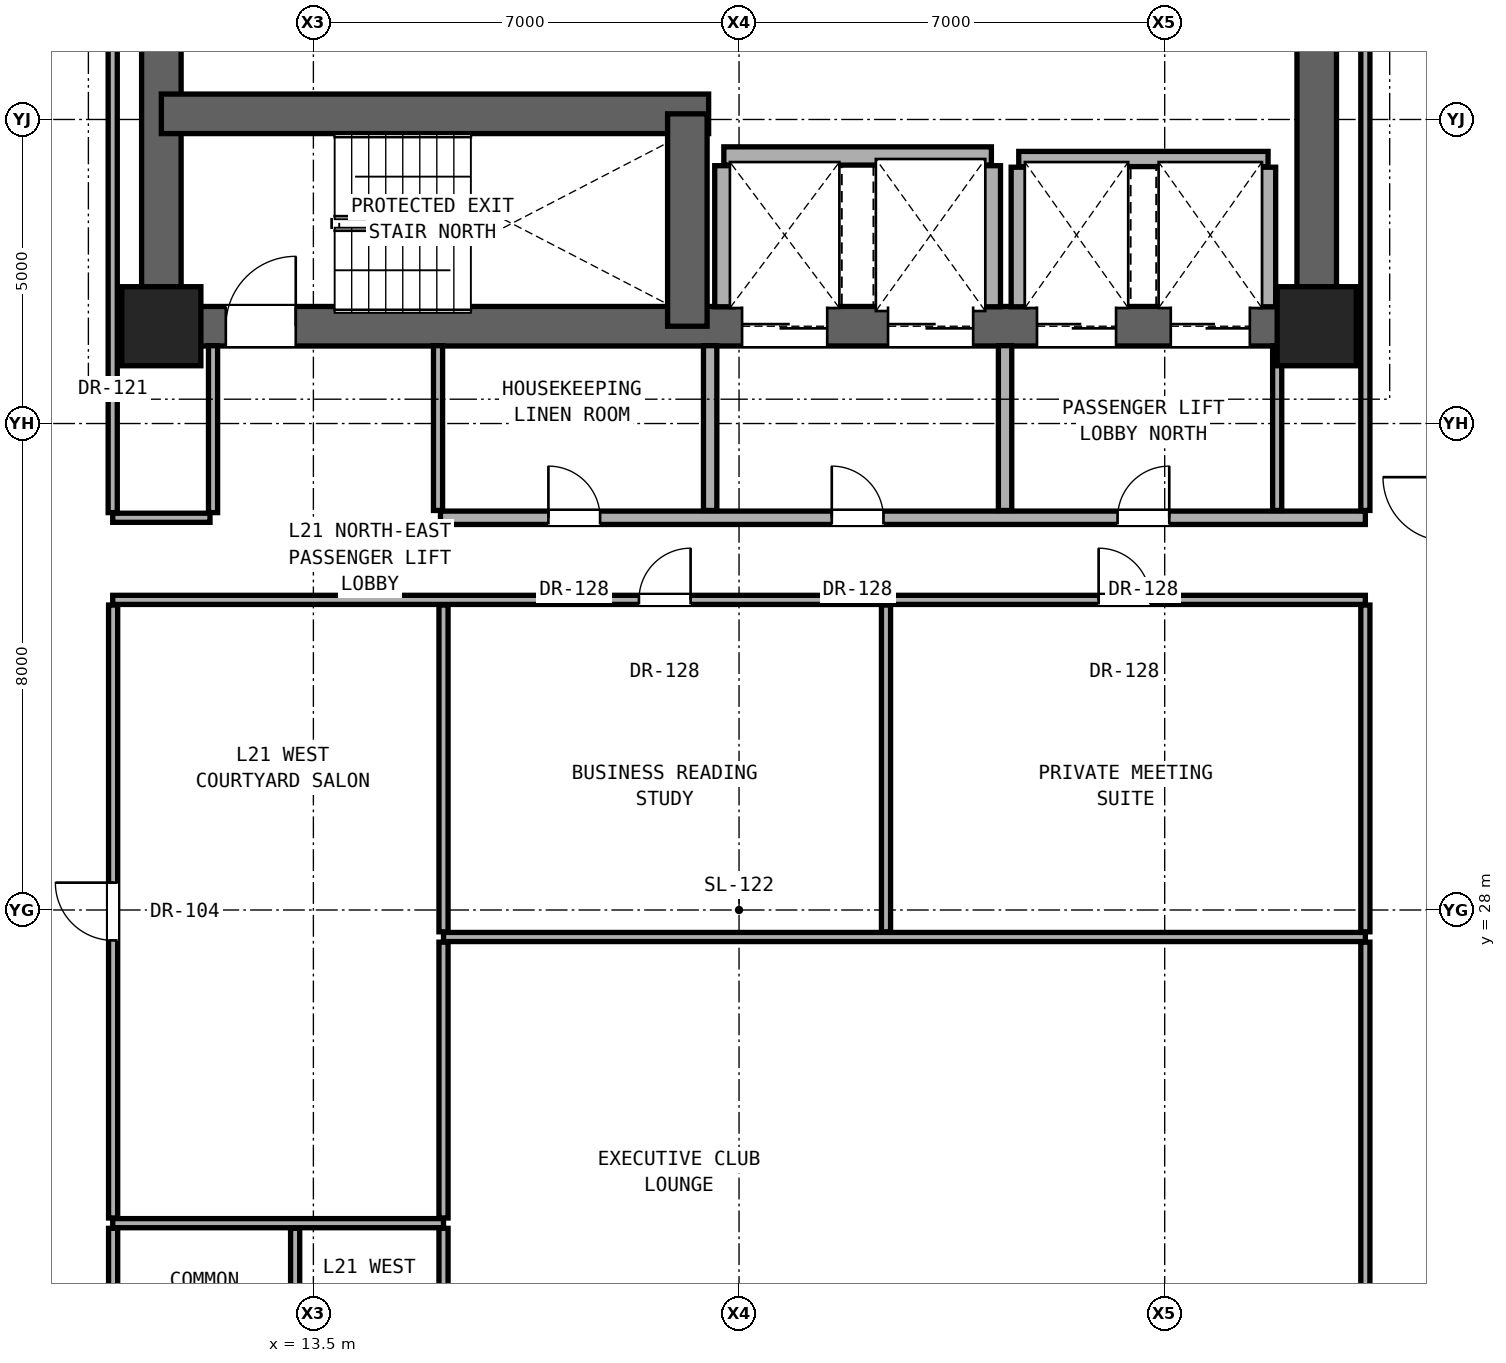
"""IFC4 building model, lengths in metres.
Left out: names, types, materials, properties, quantities, classifications, styles, units other than length and angle.
Written with IfcOpenShell. Run it as: python <this file> out.ifc"""

import sys

from ifc_helpers import new_model, si_unit, direction, frame, frame_2d, origin, origin_2d, place, context, subcontext, project, spatial, rectangle, extrude, element, fill, save


model = new_model("IFC4")
c1 = context("Model", 3, precision=1e-05, world=origin(), true_north=direction((0.0, 1.0)))
c2 = subcontext(c1, "Body", "Model", "MODEL_VIEW")
j1 = project(units=[si_unit("LENGTHUNIT", "METRE"), si_unit("PLANEANGLEUNIT", "RADIAN")], contexts=[c1])
p1 = place(None, origin())
s1 = spatial("IfcSite", under=j1, at=p1, CompositionType="ELEMENT")
p2 = place(p1, origin())
s2 = spatial("IfcBuilding", under=s1, at=p2, CompositionType="ELEMENT")
p3 = place(p2, frame((0.0, 0.0, 75.2)))
s3 = spatial("IfcBuildingStorey", under=s2, at=p3, CompositionType="ELEMENT", Elevation=75.2)
for number, where, z_axis, x_axis in (
    (1, (11.0, 37.6, 0.0), (0.0, 0.0, 1.0), (1.0, 0.0, 0.0)),
    (2, (30.0, 37.6, 0.0), (0.0, 0.0, 1.0), (1.0, 0.0, 0.0)),
):
    element("IfcColumn", number, at=place(p3, frame(where, z_axis=z_axis, x_axis=x_axis)), inside=s3, PredefinedType="COLUMN", context=c2, shape_type="SweptSolid", body=[
        extrude(rectangle(XDim=1.3, YDim=1.3, at=origin_2d()), origin(), (0.0, 0.0, 1.0), 3.3),
    ])
for number, where, z_axis, x_axis in (
    (3, (11.0, 37.6, 0.0), (0.0, 0.0, 1.0), (0.0, 1.0, 0.0)),
    (4, (30.0, 37.6, 0.0), (0.0, 0.0, 1.0), (0.0, 1.0, 0.0)),
):
    element("IfcWall", number, at=place(p3, frame(where, z_axis=z_axis, x_axis=x_axis)), inside=s3, PredefinedType="SHEAR", context=c2, shape_type="SweptSolid", body=[
        extrude(rectangle(XDim=6.0, YDim=0.65, at=frame_2d((3.0, 0.0))), origin(), (0.0, 0.0, 1.0), 3.06),
    ])
p4 = place(p3, frame((11.0, 37.6, 0.0), z_axis=(0.0, 0.0, 1.0), x_axis=(1.0, 0.0, 0.0)))
e5 = element("IfcWall", 5, at=p4, inside=s3, PredefinedType="SHEAR", context=c2, shape_type="SweptSolid", body=[
    extrude(rectangle(XDim=19.0, YDim=0.65, at=frame_2d((9.5, 0.0))), origin(), (0.0, 0.0, 1.0), 3.06),
])
p5 = place(p4, frame((1.06, 0.0, 0.0)))
e6 = element("IfcOpeningElement", 6, at=p5, cuts=e5, PredefinedType="OPENING", context=c2, shape_type="SweptSolid", body=[
    extrude(rectangle(XDim=1.15, YDim=2.2, at=frame_2d((0.575, 1.1))), frame((0.0, 0.335, 0.0), z_axis=(0.0, -1.0, 0.0), x_axis=(1.0, 0.0, 0.0)), (0.0, 0.0, 1.0), 0.67),
])
p6 = place(p4, frame((9.55, 0.0, 0.0)))
e7 = element("IfcOpeningElement", 7, at=p6, cuts=e5, PredefinedType="OPENING", context=c2, shape_type="SweptSolid", body=[
    extrude(rectangle(XDim=1.4, YDim=2.35, at=frame_2d((0.7, 1.175))), frame((0.0, 0.335, 0.0), z_axis=(0.0, -1.0, 0.0), x_axis=(1.0, 0.0, 0.0)), (0.0, 0.0, 1.0), 0.67),
])
p7 = place(p4, frame((11.95, 0.0, 0.0)))
e8 = element("IfcOpeningElement", 8, at=p7, cuts=e5, PredefinedType="OPENING", context=c2, shape_type="SweptSolid", body=[
    extrude(rectangle(XDim=1.4, YDim=2.35, at=frame_2d((0.7, 1.175))), frame((0.0, 0.335, 0.0), z_axis=(0.0, -1.0, 0.0), x_axis=(1.0, 0.0, 0.0)), (0.0, 0.0, 1.0), 0.67),
])
p8 = place(p4, frame((14.4, 0.0, 0.0)))
e9 = element("IfcOpeningElement", 9, at=p8, cuts=e5, PredefinedType="OPENING", context=c2, shape_type="SweptSolid", body=[
    extrude(rectangle(XDim=1.3, YDim=2.3, at=frame_2d((0.65, 1.15))), frame((0.0, 0.335, 0.0), z_axis=(0.0, -1.0, 0.0), x_axis=(1.0, 0.0, 0.0)), (0.0, 0.0, 1.0), 0.67),
])
p9 = place(p4, frame((16.6, 0.0, 0.0)))
e10 = element("IfcOpeningElement", 10, at=p9, cuts=e5, PredefinedType="OPENING", context=c2, shape_type="SweptSolid", body=[
    extrude(rectangle(XDim=1.3, YDim=2.3, at=frame_2d((0.65, 1.15))), frame((0.0, 0.335, 0.0), z_axis=(0.0, -1.0, 0.0), x_axis=(1.0, 0.0, 0.0)), (0.0, 0.0, 1.0), 0.67),
])
p10 = place(p3, frame((11.0, 41.093, 0.0), z_axis=(0.0, 0.0, 1.0), x_axis=(1.0, 0.0, 0.0)))
e11 = element("IfcWall", 11, at=p10, inside=s3, PredefinedType="SHEAR", context=c2, shape_type="SweptSolid", body=[
    extrude(rectangle(XDim=9.0, YDim=0.65, at=frame_2d((4.5, 0.0))), origin(), (0.0, 0.0, 1.0), 3.06),
])
p11 = place(p3, frame((19.65, 37.6, 0.0), z_axis=(0.0, 0.0, 1.0), x_axis=(0.0, 1.0, 0.0)))
e12 = element("IfcWall", 12, at=p11, inside=s3, PredefinedType="SHEAR", context=c2, shape_type="SweptSolid", body=[
    extrude(rectangle(XDim=3.493, YDim=0.65, at=frame_2d((1.747, 0.0))), origin(), (0.0, 0.0, 1.0), 3.06),
])
p12 = place(p3, frame((10.2, 22.85, 0.0), z_axis=(0.0, 0.0, 1.0), x_axis=(1.0, 0.0, 0.0)))
e13 = element("IfcWall", 13, at=p12, inside=s3, PredefinedType="PARTITIONING", context=c2, shape_type="SweptSolid", body=[
    extrude(rectangle(XDim=5.44, YDim=0.15, at=frame_2d((2.72, 0.0))), origin(), (0.0, 0.0, 1.0), 2.104),
])
p13 = place(p3, frame((15.64, 27.556, 0.0), z_axis=(0.0, 0.0, 1.0), x_axis=(1.0, 0.0, 0.0)))
e14 = element("IfcWall", 14, at=p13, inside=s3, PredefinedType="PARTITIONING", context=c2, shape_type="SweptSolid", body=[
    extrude(rectangle(XDim=15.16, YDim=0.15, at=frame_2d((7.58, 0.0))), origin(), (0.0, 0.0, 1.0), 2.104),
])
p14 = place(p3, frame((10.2, 33.1, 0.0), z_axis=(0.0, 0.0, 1.0), x_axis=(1.0, 0.0, 0.0)))
e15 = element("IfcWall", 15, at=p14, inside=s3, PredefinedType="PARTITIONING", context=c2, shape_type="SweptSolid", body=[
    extrude(rectangle(XDim=20.6, YDim=0.15, at=frame_2d((10.3, 0.0))), origin(), (0.0, 0.0, 1.0), 2.104),
])
p15 = place(p14, frame((8.654, 0.0, 0.0)))
e16 = element("IfcOpeningElement", 16, at=p15, cuts=e15, PredefinedType="OPENING", context=c2, shape_type="SweptSolid", body=[
    extrude(rectangle(XDim=0.85, YDim=2.01, at=frame_2d((0.425, 1.005))), frame((0.0, 0.085, 0.0), z_axis=(0.0, -1.0, 0.0), x_axis=(1.0, 0.0, 0.0)), (0.0, 0.0, 1.0), 0.17),
])
p16 = place(p14, frame((16.213, 0.0, 0.0)))
e17 = element("IfcOpeningElement", 17, at=p16, cuts=e15, PredefinedType="OPENING", context=c2, shape_type="SweptSolid", body=[
    extrude(rectangle(XDim=0.85, YDim=2.01, at=frame_2d((0.425, 1.005))), frame((0.0, 0.085, 0.0), z_axis=(0.0, -1.0, 0.0), x_axis=(1.0, 0.0, 0.0)), (0.0, 0.0, 1.0), 0.17),
])
p17 = place(p3, frame((10.2, 34.45, 0.0), z_axis=(0.0, 0.0, 1.0), x_axis=(1.0, 0.0, 0.0)))
e18 = element("IfcWall", 18, at=p17, inside=s3, PredefinedType="PARTITIONING", context=c2, shape_type="SweptSolid", body=[
    extrude(rectangle(XDim=1.6, YDim=0.15, at=frame_2d((0.8, 0.0))), origin(), (0.0, 0.0, 1.0), 2.104),
])
p18 = place(p3, frame((15.59, 34.45, 0.0), z_axis=(0.0, 0.0, 1.0), x_axis=(1.0, 0.0, 0.0)))
e19 = element("IfcWall", 19, at=p18, inside=s3, PredefinedType="SOLIDWALL", context=c2, shape_type="SweptSolid", body=[
    extrude(rectangle(XDim=15.21, YDim=0.22, at=frame_2d((7.605, 0.0))), origin(), (0.0, 0.0, 1.0), 2.104),
])
p19 = place(p18, frame((6.435, 0.0, 0.0)))
e20 = element("IfcOpeningElement", 20, at=p19, cuts=e19, PredefinedType="OPENING", context=c2, shape_type="SweptSolid", body=[
    extrude(rectangle(XDim=0.85, YDim=2.01, at=frame_2d((0.425, 1.005))), frame((0.0, 0.12, 0.0), z_axis=(0.0, -1.0, 0.0), x_axis=(1.0, 0.0, 0.0)), (0.0, 0.0, 1.0), 0.24),
])
p20 = place(p18, frame((11.135, 0.0, 0.0)))
e21 = element("IfcOpeningElement", 21, at=p20, cuts=e19, PredefinedType="OPENING", context=c2, shape_type="SweptSolid", body=[
    extrude(rectangle(XDim=0.85, YDim=2.01, at=frame_2d((0.425, 1.005))), frame((0.0, 0.12, 0.0), z_axis=(0.0, -1.0, 0.0), x_axis=(1.0, 0.0, 0.0)), (0.0, 0.0, 1.0), 0.24),
])
p21 = place(p18, frame((1.775, 0.0, 0.0)))
e22 = element("IfcOpeningElement", 22, at=p21, cuts=e19, PredefinedType="OPENING", context=c2, shape_type="SweptSolid", body=[
    extrude(rectangle(XDim=0.85, YDim=2.01, at=frame_2d((0.425, 1.005))), frame((0.0, 0.12, 0.0), z_axis=(0.0, -1.0, 0.0), x_axis=(1.0, 0.0, 0.0)), (0.0, 0.0, 1.0), 0.24),
])
p22 = place(p3, frame((25.1, 40.35, 0.0), z_axis=(0.0, 0.0, 1.0), x_axis=(1.0, 0.0, 0.0)))
e23 = element("IfcWall", 23, at=p22, inside=s3, PredefinedType="SOLIDWALL", context=c2, shape_type="SweptSolid", body=[
    extrude(rectangle(XDim=4.1, YDim=0.25, at=frame_2d((2.05, 0.0))), origin(), (0.0, 0.0, 1.0), 3.06),
])
p23 = place(p3, frame((20.25, 40.4, 0.0), z_axis=(0.0, 0.0, 1.0), x_axis=(1.0, 0.0, 0.0)))
e24 = element("IfcWall", 24, at=p23, inside=s3, PredefinedType="SOLIDWALL", context=c2, shape_type="SweptSolid", body=[
    extrude(rectangle(XDim=4.4, YDim=0.3, at=frame_2d((2.2, 0.0))), origin(), (0.0, 0.0, 1.0), 3.06),
])
p24 = place(p3, frame((10.207, 19.985, 0.0), z_axis=(0.0, 0.0, 1.0), x_axis=(0.0, 1.0, 0.0)))
e25 = element("IfcWall", 25, at=p24, inside=s3, PredefinedType="PARTITIONING", context=c2, shape_type="SweptSolid", body=[
    extrude(rectangle(XDim=2.78, YDim=0.15, at=frame_2d((1.39, 0.0))), origin(), (0.0, 0.0, 1.0), 3.06),
])
p25 = place(p3, frame((10.207, 22.935, 0.0), z_axis=(0.0, 0.0, 1.0), x_axis=(0.0, 1.0, 0.0)))
e26 = element("IfcWall", 26, at=p25, inside=s3, PredefinedType="PARTITIONING", context=c2, shape_type="SweptSolid", body=[
    extrude(rectangle(XDim=10.08, YDim=0.15, at=frame_2d((5.04, 0.0))), origin(), (0.0, 0.0, 1.0), 2.279),
])
p26 = place(p25, frame((4.565, 0.0, 0.0)))
e27 = element("IfcOpeningElement", 27, at=p26, cuts=e26, PredefinedType="OPENING", context=c2, shape_type="SweptSolid", body=[
    extrude(rectangle(XDim=0.95, YDim=2.15, at=frame_2d((0.475, 1.075))), frame((0.0, 0.085, 0.0), z_axis=(0.0, -1.0, 0.0), x_axis=(1.0, 0.0, 0.0)), (0.0, 0.0, 1.0), 0.17),
])
p27 = place(p3, frame((10.2, 34.535, 0.0), z_axis=(0.0, 0.0, 1.0), x_axis=(0.0, 1.0, 0.0)))
e28 = element("IfcWall", 28, at=p27, inside=s3, PredefinedType="PARTITIONING", context=c2, shape_type="SweptSolid", body=[
    extrude(rectangle(XDim=9.13, YDim=0.15, at=frame_2d((4.565, 0.0))), origin(), (0.0, 0.0, 1.0), 2.436),
])
p28 = place(p3, frame((11.85, 34.535, 0.0), z_axis=(0.0, 0.0, 1.0), x_axis=(0.0, 1.0, 0.0)))
e29 = element("IfcWall", 29, at=p28, inside=s3, PredefinedType="PARTITIONING", context=c2, shape_type="SweptSolid", body=[
    extrude(rectangle(XDim=2.745, YDim=0.15, at=frame_2d((1.373, 0.0))), origin(), (0.0, 0.0, 1.0), 3.06),
])
p29 = place(p3, frame((13.2, 19.985, 0.0), z_axis=(0.0, 0.0, 1.0), x_axis=(0.0, 1.0, 0.0)))
e30 = element("IfcWall", 30, at=p29, inside=s3, PredefinedType="PARTITIONING", context=c2, shape_type="SweptSolid", body=[
    extrude(rectangle(XDim=2.78, YDim=0.15, at=frame_2d((1.39, 0.0))), origin(), (0.0, 0.0, 1.0), 3.06),
])
p30 = place(p3, frame((15.64, 19.985, 0.0), z_axis=(0.0, 0.0, 1.0), x_axis=(0.0, 1.0, 0.0)))
e31 = element("IfcWall", 31, at=p30, inside=s3, PredefinedType="PARTITIONING", context=c2, shape_type="SweptSolid", body=[
    extrude(rectangle(XDim=2.78, YDim=0.15, at=frame_2d((1.39, 0.0))), origin(), (0.0, 0.0, 1.0), 2.589),
])
p31 = place(p3, frame((15.64, 22.935, 0.0), z_axis=(0.0, 0.0, 1.0), x_axis=(0.0, 1.0, 0.0)))
e32 = element("IfcWall", 32, at=p31, inside=s3, PredefinedType="PARTITIONING", context=c2, shape_type="SweptSolid", body=[
    extrude(rectangle(XDim=4.536, YDim=0.15, at=frame_2d((2.268, 0.0))), origin(), (0.0, 0.0, 1.0), 2.104),
])
p32 = place(p3, frame((15.64, 27.641, 0.0), z_axis=(0.0, 0.0, 1.0), x_axis=(0.0, 1.0, 0.0)))
e33 = element("IfcWall", 33, at=p32, inside=s3, PredefinedType="PARTITIONING", context=c2, shape_type="SweptSolid", body=[
    extrude(rectangle(XDim=5.374, YDim=0.15, at=frame_2d((2.687, 0.0))), origin(), (0.0, 0.0, 1.0), 2.104),
])
p33 = place(p3, frame((15.55, 34.57, 0.0), z_axis=(0.0, 0.0, 1.0), x_axis=(0.0, 1.0, 0.0)))
e34 = element("IfcWall", 34, at=p33, inside=s3, PredefinedType="PARTITIONING", context=c2, shape_type="SweptSolid", body=[
    extrude(rectangle(XDim=2.71, YDim=0.15, at=frame_2d((1.355, 0.0))), origin(), (0.0, 0.0, 1.0), 2.589),
])
p34 = place(p3, frame((20.025, 34.57, 0.0), z_axis=(0.0, 0.0, 1.0), x_axis=(0.0, 1.0, 0.0)))
e35 = element("IfcWall", 35, at=p34, inside=s3, PredefinedType="SOLIDWALL", context=c2, shape_type="SweptSolid", body=[
    extrude(rectangle(XDim=2.71, YDim=0.22, at=frame_2d((1.355, 0.0))), origin(), (0.0, 0.0, 1.0), 3.06),
])
p35 = place(p3, frame((20.25, 37.92, 0.0), z_axis=(0.0, 0.0, 1.0), x_axis=(0.0, 1.0, 0.0)))
e36 = element("IfcWall", 36, at=p35, inside=s3, PredefinedType="SOLIDWALL", context=c2, shape_type="SweptSolid", body=[
    extrude(rectangle(XDim=2.32, YDim=0.3, at=frame_2d((1.16, 0.0))), origin(), (0.0, 0.0, 1.0), 3.06),
])
p36 = place(p3, frame((22.917, 27.641, 0.0), z_axis=(0.0, 0.0, 1.0), x_axis=(0.0, 1.0, 0.0)))
e37 = element("IfcWall", 37, at=p36, inside=s3, PredefinedType="PARTITIONING", context=c2, shape_type="SweptSolid", body=[
    extrude(rectangle(XDim=5.374, YDim=0.15, at=frame_2d((2.687, 0.0))), origin(), (0.0, 0.0, 1.0), 2.104),
])
p37 = place(p3, frame((24.65, 37.92, 0.0), z_axis=(0.0, 0.0, 1.0), x_axis=(0.0, 1.0, 0.0)))
e38 = element("IfcWall", 38, at=p37, inside=s3, PredefinedType="SOLIDWALL", context=c2, shape_type="SweptSolid", body=[
    extrude(rectangle(XDim=2.32, YDim=0.3, at=frame_2d((1.16, 0.0))), origin(), (0.0, 0.0, 1.0), 3.06),
])
p38 = place(p3, frame((24.875, 34.57, 0.0), z_axis=(0.0, 0.0, 1.0), x_axis=(0.0, 1.0, 0.0)))
e39 = element("IfcWall", 39, at=p38, inside=s3, PredefinedType="SOLIDWALL", context=c2, shape_type="SweptSolid", body=[
    extrude(rectangle(XDim=2.71, YDim=0.22, at=frame_2d((1.355, 0.0))), origin(), (0.0, 0.0, 1.0), 3.06),
])
p39 = place(p3, frame((25.1, 37.92, 0.0), z_axis=(0.0, 0.0, 1.0), x_axis=(0.0, 1.0, 0.0)))
e40 = element("IfcWall", 40, at=p39, inside=s3, PredefinedType="SOLIDWALL", context=c2, shape_type="SweptSolid", body=[
    extrude(rectangle(XDim=2.295, YDim=0.25, at=frame_2d((1.147, 0.0))), origin(), (0.0, 0.0, 1.0), 3.06),
])
p40 = place(p3, frame((29.35, 34.57, 0.0), z_axis=(0.0, 0.0, 1.0), x_axis=(0.0, 1.0, 0.0)))
e41 = element("IfcWall", 41, at=p40, inside=s3, PredefinedType="PARTITIONING", context=c2, shape_type="SweptSolid", body=[
    extrude(rectangle(XDim=2.71, YDim=0.15, at=frame_2d((1.355, 0.0))), origin(), (0.0, 0.0, 1.0), 3.06),
])
p41 = place(p3, frame((29.2, 37.92, 0.0), z_axis=(0.0, 0.0, 1.0), x_axis=(0.0, 1.0, 0.0)))
e42 = element("IfcWall", 42, at=p41, inside=s3, PredefinedType="SOLIDWALL", context=c2, shape_type="SweptSolid", body=[
    extrude(rectangle(XDim=2.295, YDim=0.25, at=frame_2d((1.147, 0.0))), origin(), (0.0, 0.0, 1.0), 3.06),
])
p42 = place(p3, frame((30.8, 19.985, 0.0), z_axis=(0.0, 0.0, 1.0), x_axis=(0.0, 1.0, 0.0)))
e43 = element("IfcWall", 43, at=p42, inside=s3, PredefinedType="PARTITIONING", context=c2, shape_type="SweptSolid", body=[
    extrude(rectangle(XDim=7.486, YDim=0.15, at=frame_2d((3.743, 0.0))), origin(), (0.0, 0.0, 1.0), 2.279),
])
p43 = place(p3, frame((30.8, 27.641, 0.0), z_axis=(0.0, 0.0, 1.0), x_axis=(0.0, 1.0, 0.0)))
e44 = element("IfcWall", 44, at=p43, inside=s3, PredefinedType="PARTITIONING", context=c2, shape_type="SweptSolid", body=[
    extrude(rectangle(XDim=5.374, YDim=0.15, at=frame_2d((2.687, 0.0))), origin(), (0.0, 0.0, 1.0), 2.279),
])
p44 = place(p3, frame((30.8, 34.57, 0.0), z_axis=(0.0, 0.0, 1.0), x_axis=(0.0, 1.0, 0.0)))
e45 = element("IfcWall", 45, at=p44, inside=s3, PredefinedType="PARTITIONING", context=c2, shape_type="SweptSolid", body=[
    extrude(rectangle(XDim=9.095, YDim=0.15, at=frame_2d((4.547, 0.0))), origin(), (0.0, 0.0, 1.0), 2.436),
])
p45 = place(p5, origin())
e46 = element("IfcDoor", 46, at=p45, inside=s3, OperationType="SINGLE_SWING_RIGHT", PredefinedType="DOOR", context=c2, shape_type="SweptSolid", body=[
    extrude(rectangle(XDim=1.15, YDim=2.2, at=frame_2d((0.575, 1.1))), frame((0.0, 0.025, 0.0), z_axis=(0.0, -1.0, 0.0), x_axis=(1.0, 0.0, 0.0)), (0.0, 0.0, 1.0), 0.05),
])
fill(e6, e46)
p46 = place(p19, origin())
e47 = element("IfcDoor", 47, at=p46, inside=s3, OperationType="SINGLE_SWING_LEFT", PredefinedType="DOOR", context=c2, shape_type="SweptSolid", body=[
    extrude(rectangle(XDim=0.85, YDim=2.01, at=frame_2d((0.425, 1.005))), frame((0.0, 0.025, 0.0), z_axis=(0.0, -1.0, 0.0), x_axis=(1.0, 0.0, 0.0)), (0.0, 0.0, 1.0), 0.05),
])
fill(e20, e47)
p47 = place(p20, origin())
e48 = element("IfcDoor", 48, at=p47, inside=s3, OperationType="SINGLE_SWING_RIGHT", PredefinedType="DOOR", context=c2, shape_type="SweptSolid", body=[
    extrude(rectangle(XDim=0.85, YDim=2.01, at=frame_2d((0.425, 1.005))), frame((0.0, 0.025, 0.0), z_axis=(0.0, -1.0, 0.0), x_axis=(1.0, 0.0, 0.0)), (0.0, 0.0, 1.0), 0.05),
])
fill(e21, e48)
p48 = place(p21, origin())
e49 = element("IfcDoor", 49, at=p48, inside=s3, OperationType="SINGLE_SWING_LEFT", PredefinedType="DOOR", context=c2, shape_type="SweptSolid", body=[
    extrude(rectangle(XDim=0.85, YDim=2.01, at=frame_2d((0.425, 1.005))), frame((0.0, 0.025, 0.0), z_axis=(0.0, -1.0, 0.0), x_axis=(1.0, 0.0, 0.0)), (0.0, 0.0, 1.0), 0.05),
])
fill(e22, e49)
p49 = place(p26, origin())
e50 = element("IfcDoor", 50, at=p49, inside=s3, OperationType="SINGLE_SWING_RIGHT", PredefinedType="DOOR", context=c2, shape_type="SweptSolid", body=[
    extrude(rectangle(XDim=0.95, YDim=2.15, at=frame_2d((0.475, 1.075))), frame((0.0, 0.025, 0.0), z_axis=(0.0, -1.0, 0.0), x_axis=(1.0, 0.0, 0.0)), (0.0, 0.0, 1.0), 0.05),
])
fill(e27, e50)
p50 = place(p15, origin())
e51 = element("IfcDoor", 51, at=p50, inside=s3, OperationType="SINGLE_SWING_RIGHT", PredefinedType="DOOR", context=c2, shape_type="SweptSolid", body=[
    extrude(rectangle(XDim=0.85, YDim=2.01, at=frame_2d((0.425, 1.005))), frame((0.0, 0.025, 0.0), z_axis=(0.0, -1.0, 0.0), x_axis=(1.0, 0.0, 0.0)), (0.0, 0.0, 1.0), 0.05),
])
fill(e16, e51)
p51 = place(p16, origin())
e52 = element("IfcDoor", 52, at=p51, inside=s3, OperationType="SINGLE_SWING_LEFT", PredefinedType="DOOR", context=c2, shape_type="SweptSolid", body=[
    extrude(rectangle(XDim=0.85, YDim=2.01, at=frame_2d((0.425, 1.005))), frame((0.0, 0.025, 0.0), z_axis=(0.0, -1.0, 0.0), x_axis=(1.0, 0.0, 0.0)), (0.0, 0.0, 1.0), 0.05),
])
fill(e17, e52)
p52 = place(p6, origin())
e53 = element("IfcDoor", 53, at=p52, inside=s3, OperationType="DOUBLE_DOOR_SLIDING", PredefinedType="DOOR", context=c2, shape_type="SweptSolid", body=[
    extrude(rectangle(XDim=1.4, YDim=2.35, at=frame_2d((0.7, 1.175))), frame((0.0, 0.025, 0.0), z_axis=(0.0, -1.0, 0.0), x_axis=(1.0, 0.0, 0.0)), (0.0, 0.0, 1.0), 0.05),
])
fill(e7, e53)
p53 = place(p7, origin())
e54 = element("IfcDoor", 54, at=p53, inside=s3, OperationType="DOUBLE_DOOR_SLIDING", PredefinedType="DOOR", context=c2, shape_type="SweptSolid", body=[
    extrude(rectangle(XDim=1.4, YDim=2.35, at=frame_2d((0.7, 1.175))), frame((0.0, 0.025, 0.0), z_axis=(0.0, -1.0, 0.0), x_axis=(1.0, 0.0, 0.0)), (0.0, 0.0, 1.0), 0.05),
])
fill(e8, e54)
p54 = place(p8, origin())
e55 = element("IfcDoor", 55, at=p54, inside=s3, OperationType="DOUBLE_DOOR_SLIDING", PredefinedType="DOOR", context=c2, shape_type="SweptSolid", body=[
    extrude(rectangle(XDim=1.3, YDim=2.3, at=frame_2d((0.65, 1.15))), frame((0.0, 0.025, 0.0), z_axis=(0.0, -1.0, 0.0), x_axis=(1.0, 0.0, 0.0)), (0.0, 0.0, 1.0), 0.05),
])
fill(e9, e55)
p55 = place(p9, origin())
e56 = element("IfcDoor", 56, at=p55, inside=s3, OperationType="DOUBLE_DOOR_SLIDING", PredefinedType="DOOR", context=c2, shape_type="SweptSolid", body=[
    extrude(rectangle(XDim=1.3, YDim=2.3, at=frame_2d((0.65, 1.15))), frame((0.0, 0.025, 0.0), z_axis=(0.0, -1.0, 0.0), x_axis=(1.0, 0.0, 0.0)), (0.0, 0.0, 1.0), 0.05),
])
fill(e10, e56)
save(model, sys.argv[1])
